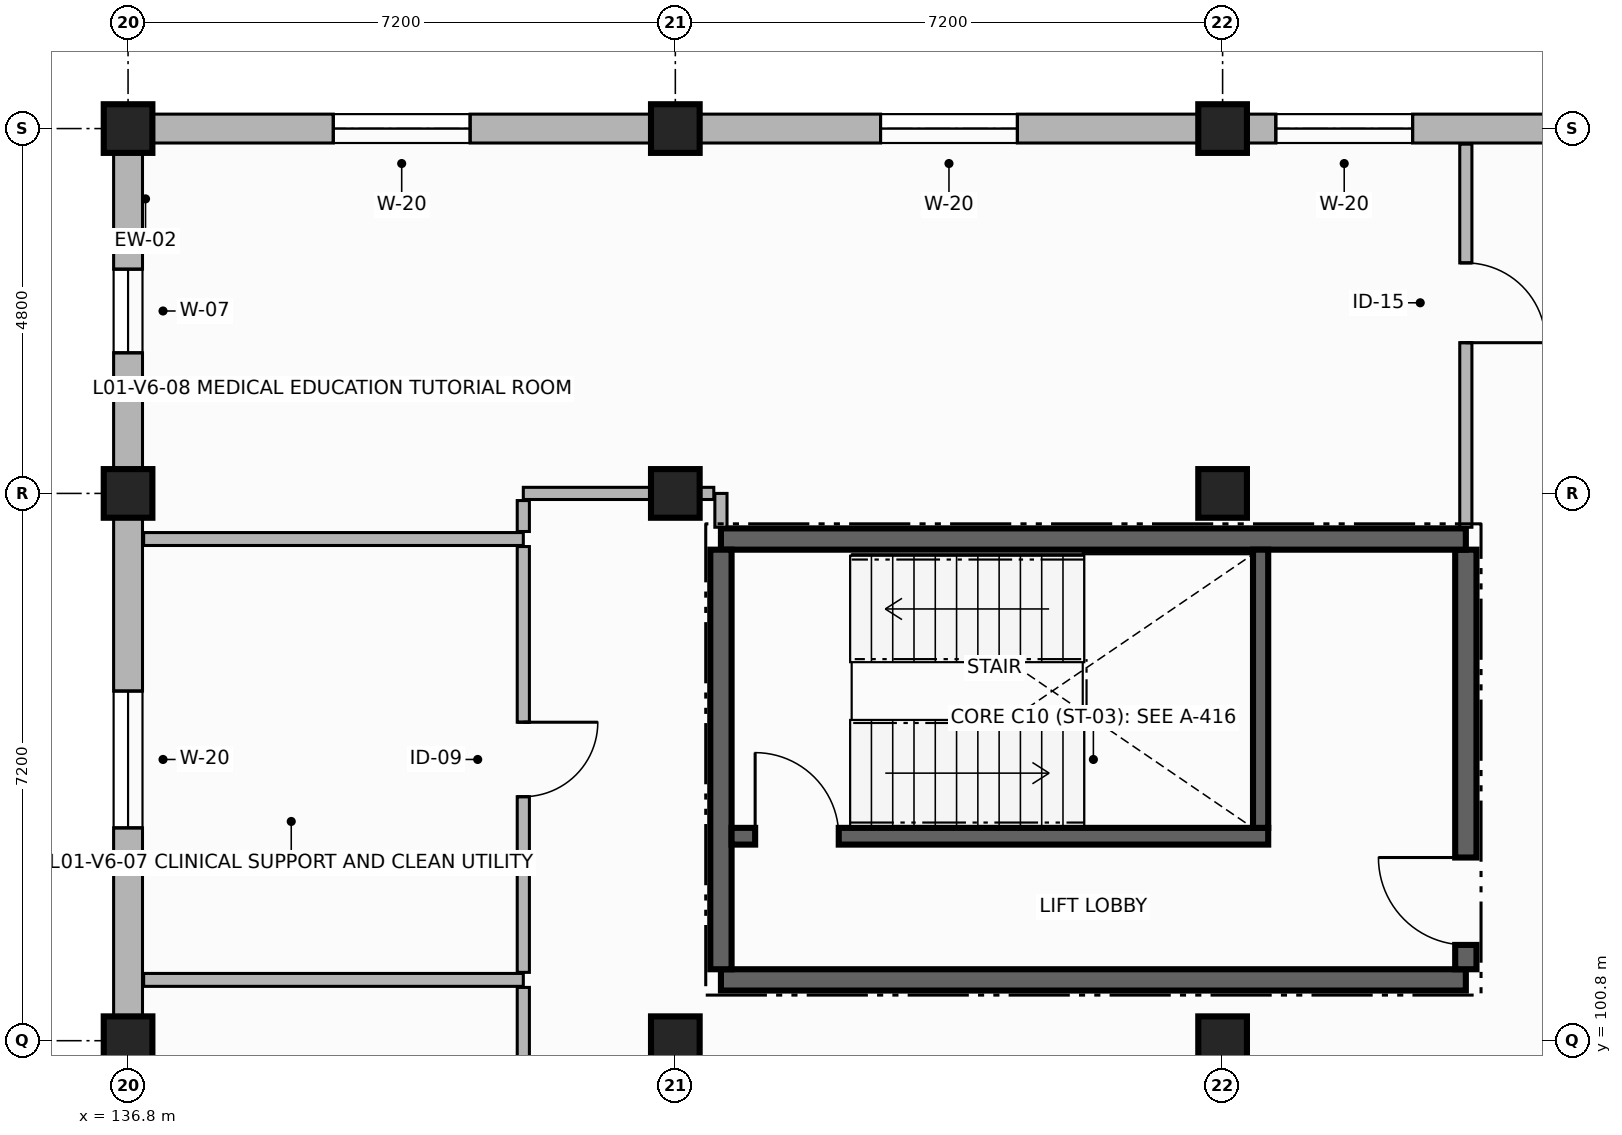
"""IFC4 building model, lengths in metres.
Left out: names, types, materials, properties, quantities, classifications, styles, units other than length and angle.
Written with IfcOpenShell. Run it as: python <this file> out.ifc"""

import sys

from ifc_helpers import new_model, si_unit, direction, frame, frame_2d, origin, origin_2d, place, context, subcontext, project, spatial, rectangle, extrude, element, fill, save


model = new_model("IFC4")
c1 = context("Model", 3, precision=1e-05, world=origin(), true_north=direction((0.0, 1.0)))
c2 = subcontext(c1, "Body", "Model", "MODEL_VIEW")
j1 = project(units=[si_unit("LENGTHUNIT", "METRE"), si_unit("PLANEANGLEUNIT", "RADIAN")], contexts=[c1])
p1 = place(None, origin())
s1 = spatial("IfcSite", under=j1, at=p1, CompositionType="ELEMENT")
p2 = place(p1, origin())
s2 = spatial("IfcBuilding", under=s1, at=p2, CompositionType="ELEMENT")
p3 = place(p2, frame((0.0, 0.0, 4.5)))
s3 = spatial("IfcBuildingStorey", under=s2, at=p3, CompositionType="ELEMENT", Elevation=4.5)
for number, where, z_axis, x_axis in (
    (1, (136.8, 100.8, 0.0), (0.0, 0.0, 1.0), (1.0, 0.0, 0.0)),
    (2, (136.8, 108.0, 0.0), (0.0, 0.0, 1.0), (1.0, 0.0, 0.0)),
    (3, (136.8, 112.8, 0.0), (0.0, 0.0, 1.0), (1.0, 0.0, 0.0)),
    (4, (144.0, 100.8, 0.0), (0.0, 0.0, 1.0), (1.0, 0.0, 0.0)),
    (5, (144.0, 108.0, 0.0), (0.0, 0.0, 1.0), (1.0, 0.0, 0.0)),
    (6, (144.0, 112.8, 0.0), (0.0, 0.0, 1.0), (1.0, 0.0, 0.0)),
    (7, (151.2, 100.8, 0.0), (0.0, 0.0, 1.0), (1.0, 0.0, 0.0)),
    (8, (151.2, 108.0, 0.0), (0.0, 0.0, 1.0), (1.0, 0.0, 0.0)),
    (9, (151.2, 112.8, 0.0), (0.0, 0.0, 1.0), (1.0, 0.0, 0.0)),
):
    element("IfcColumn", number, at=place(p3, frame(where, z_axis=z_axis, x_axis=x_axis)), inside=s3, PredefinedType="COLUMN", context=c2, shape_type="SweptSolid", body=[
        extrude(rectangle(XDim=0.64, YDim=0.64, at=origin_2d()), origin(), (0.0, 0.0, 1.0), 3.58),
    ])
p4 = place(p3, frame((158.4, 112.8, 0.0), z_axis=(0.0, 0.0, 1.0), x_axis=(-1.0, 0.0, 0.0)))
e10 = element("IfcWall", 10, at=p4, inside=s3, PredefinedType="SOLIDWALL", context=c2, shape_type="SweptSolid", body=[
    extrude(rectangle(XDim=7.2, YDim=0.38, at=frame_2d((3.6, 0.0))), origin(), (0.0, 0.0, 1.0), 2.91),
])
p5 = place(p4, frame((4.7, 0.0, 0.85)))
e11 = element("IfcOpeningElement", 11, at=p5, cuts=e10, PredefinedType="OPENING", context=c2, shape_type="SweptSolid", body=[
    extrude(rectangle(XDim=1.8, YDim=1.85, at=frame_2d((0.9, 0.925))), frame((0.0, 0.2, 0.0), z_axis=(0.0, -1.0, 0.0), x_axis=(1.0, 0.0, 0.0)), (0.0, 0.0, 1.0), 0.4),
])
p6 = place(p3, frame((151.2, 112.8, 0.0), z_axis=(0.0, 0.0, 1.0), x_axis=(-1.0, 0.0, 0.0)))
e12 = element("IfcWall", 12, at=p6, inside=s3, PredefinedType="SOLIDWALL", context=c2, shape_type="SweptSolid", body=[
    extrude(rectangle(XDim=7.2, YDim=0.38, at=frame_2d((3.6, 0.0))), origin(), (0.0, 0.0, 1.0), 2.91),
])
p7 = place(p6, frame((2.7, 0.0, 0.85)))
e13 = element("IfcOpeningElement", 13, at=p7, cuts=e12, PredefinedType="OPENING", context=c2, shape_type="SweptSolid", body=[
    extrude(rectangle(XDim=1.8, YDim=1.85, at=frame_2d((0.9, 0.925))), frame((0.0, 0.2, 0.0), z_axis=(0.0, -1.0, 0.0), x_axis=(1.0, 0.0, 0.0)), (0.0, 0.0, 1.0), 0.4),
])
p8 = place(p3, frame((144.0, 112.8, 0.0), z_axis=(0.0, 0.0, 1.0), x_axis=(-1.0, 0.0, 0.0)))
e14 = element("IfcWall", 14, at=p8, inside=s3, PredefinedType="SOLIDWALL", context=c2, shape_type="SweptSolid", body=[
    extrude(rectangle(XDim=7.2, YDim=0.38, at=frame_2d((3.6, 0.0))), origin(), (0.0, 0.0, 1.0), 2.91),
])
p9 = place(p8, frame((2.7, 0.0, 0.85)))
e15 = element("IfcOpeningElement", 15, at=p9, cuts=e14, PredefinedType="OPENING", context=c2, shape_type="SweptSolid", body=[
    extrude(rectangle(XDim=1.8, YDim=1.85, at=frame_2d((0.9, 0.925))), frame((0.0, 0.2, 0.0), z_axis=(0.0, -1.0, 0.0), x_axis=(1.0, 0.0, 0.0)), (0.0, 0.0, 1.0), 0.4),
])
p10 = place(p3, frame((136.8, 112.8, 0.0), z_axis=(0.0, 0.0, 1.0), x_axis=(0.0, -1.0, 0.0)))
e16 = element("IfcWall", 16, at=p10, inside=s3, PredefinedType="SOLIDWALL", context=c2, shape_type="SweptSolid", body=[
    extrude(rectangle(XDim=4.8, YDim=0.38, at=frame_2d((2.4, 0.0))), origin(), (0.0, 0.0, 1.0), 2.91),
])
p11 = place(p10, frame((1.85, 0.0, 0.85)))
e17 = element("IfcOpeningElement", 17, at=p11, cuts=e16, PredefinedType="OPENING", context=c2, shape_type="SweptSolid", body=[
    extrude(rectangle(XDim=1.1, YDim=1.85, at=frame_2d((0.55, 0.925))), frame((0.0, 0.2, 0.0), z_axis=(0.0, -1.0, 0.0), x_axis=(1.0, 0.0, 0.0)), (0.0, 0.0, 1.0), 0.4),
])
p12 = place(p3, frame((136.8, 108.0, 0.0), z_axis=(0.0, 0.0, 1.0), x_axis=(0.0, -1.0, 0.0)))
e18 = element("IfcWall", 18, at=p12, inside=s3, PredefinedType="SOLIDWALL", context=c2, shape_type="SweptSolid", body=[
    extrude(rectangle(XDim=7.2, YDim=0.38, at=frame_2d((3.6, 0.0))), origin(), (0.0, 0.0, 1.0), 2.91),
])
p13 = place(p12, frame((2.6, 0.0, 0.85)))
e19 = element("IfcOpeningElement", 19, at=p13, cuts=e18, PredefinedType="OPENING", context=c2, shape_type="SweptSolid", body=[
    extrude(rectangle(XDim=1.8, YDim=1.85, at=frame_2d((0.9, 0.925))), frame((0.0, 0.2, 0.0), z_axis=(0.0, -1.0, 0.0), x_axis=(1.0, 0.0, 0.0)), (0.0, 0.0, 1.0), 0.4),
])
p14 = place(p3, frame((136.8, 100.8, 0.0), z_axis=(0.0, 0.0, 1.0), x_axis=(0.0, -1.0, 0.0)))
e20 = element("IfcWall", 20, at=p14, inside=s3, PredefinedType="SOLIDWALL", context=c2, shape_type="SweptSolid", body=[
    extrude(rectangle(XDim=7.2, YDim=0.38, at=frame_2d((3.6, 0.0))), origin(), (0.0, 0.0, 1.0), 2.91),
])
p15 = place(p14, frame((2.7, 0.0, 0.85)))
e21 = element("IfcOpeningElement", 21, at=p15, cuts=e20, PredefinedType="OPENING", context=c2, shape_type="SweptSolid", body=[
    extrude(rectangle(XDim=1.8, YDim=1.85, at=frame_2d((0.9, 0.925))), frame((0.0, 0.2, 0.0), z_axis=(0.0, -1.0, 0.0), x_axis=(1.0, 0.0, 0.0)), (0.0, 0.0, 1.0), 0.4),
])
p16 = place(p3, frame((144.6, 101.6, 0.0), z_axis=(0.0, 0.0, 1.0), x_axis=(1.0, 0.0, 0.0)))
e22 = element("IfcWall", 22, at=p16, inside=s3, PredefinedType="SHEAR", context=c2, shape_type="SweptSolid", body=[
    extrude(rectangle(XDim=9.8, YDim=0.28, at=frame_2d((4.9, 0.0))), origin(), (0.0, 0.0, 1.0), 3.58),
])
p17 = place(p3, frame((154.4, 101.74, 0.0), z_axis=(0.0, 0.0, 1.0), x_axis=(0.0, 1.0, 0.0)))
e23 = element("IfcWall", 23, at=p17, inside=s3, PredefinedType="SHEAR", context=c2, shape_type="SweptSolid", body=[
    extrude(rectangle(XDim=5.52, YDim=0.28, at=frame_2d((2.76, 0.0))), origin(), (0.0, 0.0, 1.0), 3.58),
])
p18 = place(p17, frame((0.32, 0.0, 0.0)))
e24 = element("IfcOpeningElement", 24, at=p18, cuts=e23, PredefinedType="OPENING", context=c2, shape_type="SweptSolid", body=[
    extrude(rectangle(XDim=1.15, YDim=2.2, at=frame_2d((0.575, 1.1))), frame((0.0, 0.15, 0.0), z_axis=(0.0, -1.0, 0.0), x_axis=(1.0, 0.0, 0.0)), (0.0, 0.0, 1.0), 0.3),
])
p19 = place(p3, frame((154.4, 107.4, 0.0), z_axis=(0.0, 0.0, 1.0), x_axis=(-1.0, 0.0, 0.0)))
e25 = element("IfcWall", 25, at=p19, inside=s3, PredefinedType="SHEAR", context=c2, shape_type="SweptSolid", body=[
    extrude(rectangle(XDim=9.8, YDim=0.28, at=frame_2d((4.9, 0.0))), origin(), (0.0, 0.0, 1.0), 3.58),
])
p20 = place(p3, frame((144.6, 107.26, 0.0), z_axis=(0.0, 0.0, 1.0), x_axis=(0.0, -1.0, 0.0)))
e26 = element("IfcWall", 26, at=p20, inside=s3, PredefinedType="SHEAR", context=c2, shape_type="SweptSolid", body=[
    extrude(rectangle(XDim=5.52, YDim=0.28, at=frame_2d((2.76, 0.0))), origin(), (0.0, 0.0, 1.0), 3.58),
])
p21 = place(p3, frame((144.74, 103.49, 0.0), z_axis=(0.0, 0.0, 1.0), x_axis=(1.0, 0.0, 0.0)))
e27 = element("IfcWall", 27, at=p21, inside=s3, PredefinedType="SHEAR", context=c2, shape_type="SweptSolid", body=[
    extrude(rectangle(XDim=7.06, YDim=0.22, at=frame_2d((3.53, 0.0))), origin(), (0.0, 0.0, 1.0), 3.58),
])
p22 = place(p21, frame((0.31, 0.0, 0.0)))
e28 = element("IfcOpeningElement", 28, at=p22, cuts=e27, PredefinedType="OPENING", context=c2, shape_type="SweptSolid", body=[
    extrude(rectangle(XDim=1.1, YDim=2.15, at=frame_2d((0.55, 1.075))), frame((0.0, 0.12, 0.0), z_axis=(0.0, -1.0, 0.0), x_axis=(1.0, 0.0, 0.0)), (0.0, 0.0, 1.0), 0.24),
])
p23 = place(p3, frame((151.7, 103.6, 0.0), z_axis=(0.0, 0.0, 1.0), x_axis=(0.0, 1.0, 0.0)))
e29 = element("IfcWall", 29, at=p23, inside=s3, PredefinedType="SHEAR", context=c2, shape_type="SweptSolid", body=[
    extrude(rectangle(XDim=3.66, YDim=0.2, at=frame_2d((1.83, 0.0))), origin(), (0.0, 0.0, 1.0), 3.58),
])
p24 = place(p3, frame((137.005, 101.6, 0.0), z_axis=(0.0, 0.0, 1.0), x_axis=(1.0, 0.0, 0.0)))
e30 = element("IfcWall", 30, at=p24, inside=s3, PredefinedType="PARTITIONING", context=c2, shape_type="SweptSolid", body=[
    extrude(rectangle(XDim=4.995, YDim=0.17, at=frame_2d((2.498, 0.0))), origin(), (0.0, 0.0, 1.0), 2.89),
])
p25 = place(p3, frame((142.0, 101.501, 0.0), z_axis=(0.0, 0.0, 1.0), x_axis=(0.0, -1.0, 0.0)))
e31 = element("IfcWall", 31, at=p25, inside=s3, PredefinedType="PARTITIONING", context=c2, shape_type="SweptSolid", body=[
    extrude(rectangle(XDim=2.701, YDim=0.16, at=frame_2d((1.351, 0.0))), origin(), (0.0, 0.0, 1.0), 2.89),
])
p26 = place(p3, frame((137.005, 107.4, 0.0), z_axis=(0.0, 0.0, 1.0), x_axis=(1.0, 0.0, 0.0)))
e32 = element("IfcWall", 32, at=p26, inside=s3, PredefinedType="PARTITIONING", context=c2, shape_type="SweptSolid", body=[
    extrude(rectangle(XDim=4.995, YDim=0.17, at=frame_2d((2.498, 0.0))), origin(), (0.0, 0.0, 1.0), 2.89),
])
p27 = place(p3, frame((142.0, 107.301, 0.0), z_axis=(0.0, 0.0, 1.0), x_axis=(0.0, -1.0, 0.0)))
e33 = element("IfcWall", 33, at=p27, inside=s3, PredefinedType="PARTITIONING", context=c2, shape_type="SweptSolid", body=[
    extrude(rectangle(XDim=5.602, YDim=0.16, at=frame_2d((2.801, 0.0))), origin(), (0.0, 0.0, 1.0), 2.89),
])
p28 = place(p27, frame((2.311, 0.0, 0.0)))
e34 = element("IfcOpeningElement", 34, at=p28, cuts=e33, PredefinedType="OPENING", context=c2, shape_type="SweptSolid", body=[
    extrude(rectangle(XDim=0.98, YDim=2.15, at=frame_2d((0.49, 1.075))), frame((0.0, 0.09, 0.0), z_axis=(0.0, -1.0, 0.0), x_axis=(1.0, 0.0, 0.0)), (0.0, 0.0, 1.0), 0.18),
])
p29 = place(p3, frame((144.6, 107.555, 0.0), z_axis=(0.0, 0.0, 1.0), x_axis=(0.0, 1.0, 0.0)))
e35 = element("IfcWall", 35, at=p29, inside=s3, PredefinedType="PARTITIONING", context=c2, shape_type="SweptSolid", body=[
    extrude(rectangle(XDim=0.445, YDim=0.16, at=frame_2d((0.223, 0.0))), origin(), (0.0, 0.0, 1.0), 2.89),
])
p30 = place(p3, frame((144.506, 108.0, 0.0), z_axis=(0.0, 0.0, 1.0), x_axis=(-1.0, 0.0, 0.0)))
e36 = element("IfcWall", 36, at=p30, inside=s3, PredefinedType="PARTITIONING", context=c2, shape_type="SweptSolid", body=[
    extrude(rectangle(XDim=2.506, YDim=0.16, at=frame_2d((1.253, 0.0))), origin(), (0.0, 0.0, 1.0), 2.89),
])
p31 = place(p3, frame((142.0, 107.906, 0.0), z_axis=(0.0, 0.0, 1.0), x_axis=(0.0, -1.0, 0.0)))
e37 = element("IfcWall", 37, at=p31, inside=s3, PredefinedType="PARTITIONING", context=c2, shape_type="SweptSolid", body=[
    extrude(rectangle(XDim=0.407, YDim=0.16, at=frame_2d((0.204, 0.0))), origin(), (0.0, 0.0, 1.0), 2.89),
])
p32 = place(p3, frame((154.4, 112.595, 0.0), z_axis=(0.0, 0.0, 1.0), x_axis=(0.0, -1.0, 0.0)))
e38 = element("IfcWall", 38, at=p32, inside=s3, PredefinedType="PARTITIONING", context=c2, shape_type="SweptSolid", body=[
    extrude(rectangle(XDim=5.04, YDim=0.16, at=frame_2d((2.52, 0.0))), origin(), (0.0, 0.0, 1.0), 2.89),
])
p33 = place(p32, frame((1.562, 0.0, 0.0)))
e39 = element("IfcOpeningElement", 39, at=p33, cuts=e38, PredefinedType="OPENING", context=c2, shape_type="SweptSolid", body=[
    extrude(rectangle(XDim=1.05, YDim=2.2, at=frame_2d((0.525, 1.1))), frame((0.0, 0.09, 0.0), z_axis=(0.0, -1.0, 0.0), x_axis=(1.0, 0.0, 0.0)), (0.0, 0.0, 1.0), 0.18),
])
p34 = place(p5, origin())
e40 = element("IfcWindow", 40, at=p34, inside=s3, PartitioningType="SINGLE_PANEL", PredefinedType="WINDOW", context=c2, shape_type="SweptSolid", body=[
    extrude(rectangle(XDim=1.8, YDim=1.85, at=frame_2d((0.9, 0.925))), frame((0.0, 0.03, 0.0), z_axis=(0.0, -1.0, 0.0), x_axis=(1.0, 0.0, 0.0)), (0.0, 0.0, 1.0), 0.06),
])
fill(e11, e40)
p35 = place(p7, origin())
e41 = element("IfcWindow", 41, at=p35, inside=s3, PartitioningType="SINGLE_PANEL", PredefinedType="WINDOW", context=c2, shape_type="SweptSolid", body=[
    extrude(rectangle(XDim=1.8, YDim=1.85, at=frame_2d((0.9, 0.925))), frame((0.0, 0.03, 0.0), z_axis=(0.0, -1.0, 0.0), x_axis=(1.0, 0.0, 0.0)), (0.0, 0.0, 1.0), 0.06),
])
fill(e13, e41)
p36 = place(p9, origin())
e42 = element("IfcWindow", 42, at=p36, inside=s3, PartitioningType="SINGLE_PANEL", PredefinedType="WINDOW", context=c2, shape_type="SweptSolid", body=[
    extrude(rectangle(XDim=1.8, YDim=1.85, at=frame_2d((0.9, 0.925))), frame((0.0, 0.03, 0.0), z_axis=(0.0, -1.0, 0.0), x_axis=(1.0, 0.0, 0.0)), (0.0, 0.0, 1.0), 0.06),
])
fill(e15, e42)
p37 = place(p11, origin())
e43 = element("IfcWindow", 43, at=p37, inside=s3, PartitioningType="SINGLE_PANEL", PredefinedType="WINDOW", context=c2, shape_type="SweptSolid", body=[
    extrude(rectangle(XDim=1.1, YDim=1.85, at=frame_2d((0.55, 0.925))), frame((0.0, 0.03, 0.0), z_axis=(0.0, -1.0, 0.0), x_axis=(1.0, 0.0, 0.0)), (0.0, 0.0, 1.0), 0.06),
])
fill(e17, e43)
p38 = place(p13, origin())
e44 = element("IfcWindow", 44, at=p38, inside=s3, PartitioningType="SINGLE_PANEL", PredefinedType="WINDOW", context=c2, shape_type="SweptSolid", body=[
    extrude(rectangle(XDim=1.8, YDim=1.85, at=frame_2d((0.9, 0.925))), frame((0.0, 0.03, 0.0), z_axis=(0.0, -1.0, 0.0), x_axis=(1.0, 0.0, 0.0)), (0.0, 0.0, 1.0), 0.06),
])
fill(e19, e44)
p39 = place(p22, origin())
e45 = element("IfcDoor", 45, at=p39, inside=s3, OperationType="SINGLE_SWING_LEFT", PredefinedType="DOOR", context=c2, shape_type="SweptSolid", body=[
    extrude(rectangle(XDim=1.1, YDim=2.15, at=frame_2d((0.55, 1.075))), frame((0.0, 0.025, 0.0), z_axis=(0.0, -1.0, 0.0), x_axis=(1.0, 0.0, 0.0)), (0.0, 0.0, 1.0), 0.05),
])
fill(e28, e45)
p40 = place(p18, origin())
e46 = element("IfcDoor", 46, at=p40, inside=s3, OperationType="SINGLE_SWING_RIGHT", PredefinedType="DOOR", context=c2, shape_type="SweptSolid", body=[
    extrude(rectangle(XDim=1.15, YDim=2.2, at=frame_2d((0.575, 1.1))), frame((0.0, 0.025, 0.0), z_axis=(0.0, -1.0, 0.0), x_axis=(1.0, 0.0, 0.0)), (0.0, 0.0, 1.0), 0.05),
])
fill(e24, e46)
p41 = place(p28, origin())
e47 = element("IfcDoor", 47, at=p41, inside=s3, OperationType="SINGLE_SWING_LEFT", PredefinedType="DOOR", context=c2, shape_type="SweptSolid", body=[
    extrude(rectangle(XDim=0.98, YDim=2.15, at=frame_2d((0.49, 1.075))), frame((0.0, 0.025, 0.0), z_axis=(0.0, -1.0, 0.0), x_axis=(1.0, 0.0, 0.0)), (0.0, 0.0, 1.0), 0.05),
])
fill(e34, e47)
p42 = place(p33, origin())
e48 = element("IfcDoor", 48, at=p42, inside=s3, OperationType="SINGLE_SWING_RIGHT", PredefinedType="DOOR", context=c2, shape_type="SweptSolid", body=[
    extrude(rectangle(XDim=1.05, YDim=2.2, at=frame_2d((0.525, 1.1))), frame((0.0, 0.025, 0.0), z_axis=(0.0, -1.0, 0.0), x_axis=(1.0, 0.0, 0.0)), (0.0, 0.0, 1.0), 0.05),
])
fill(e39, e48)
save(model, sys.argv[1])
